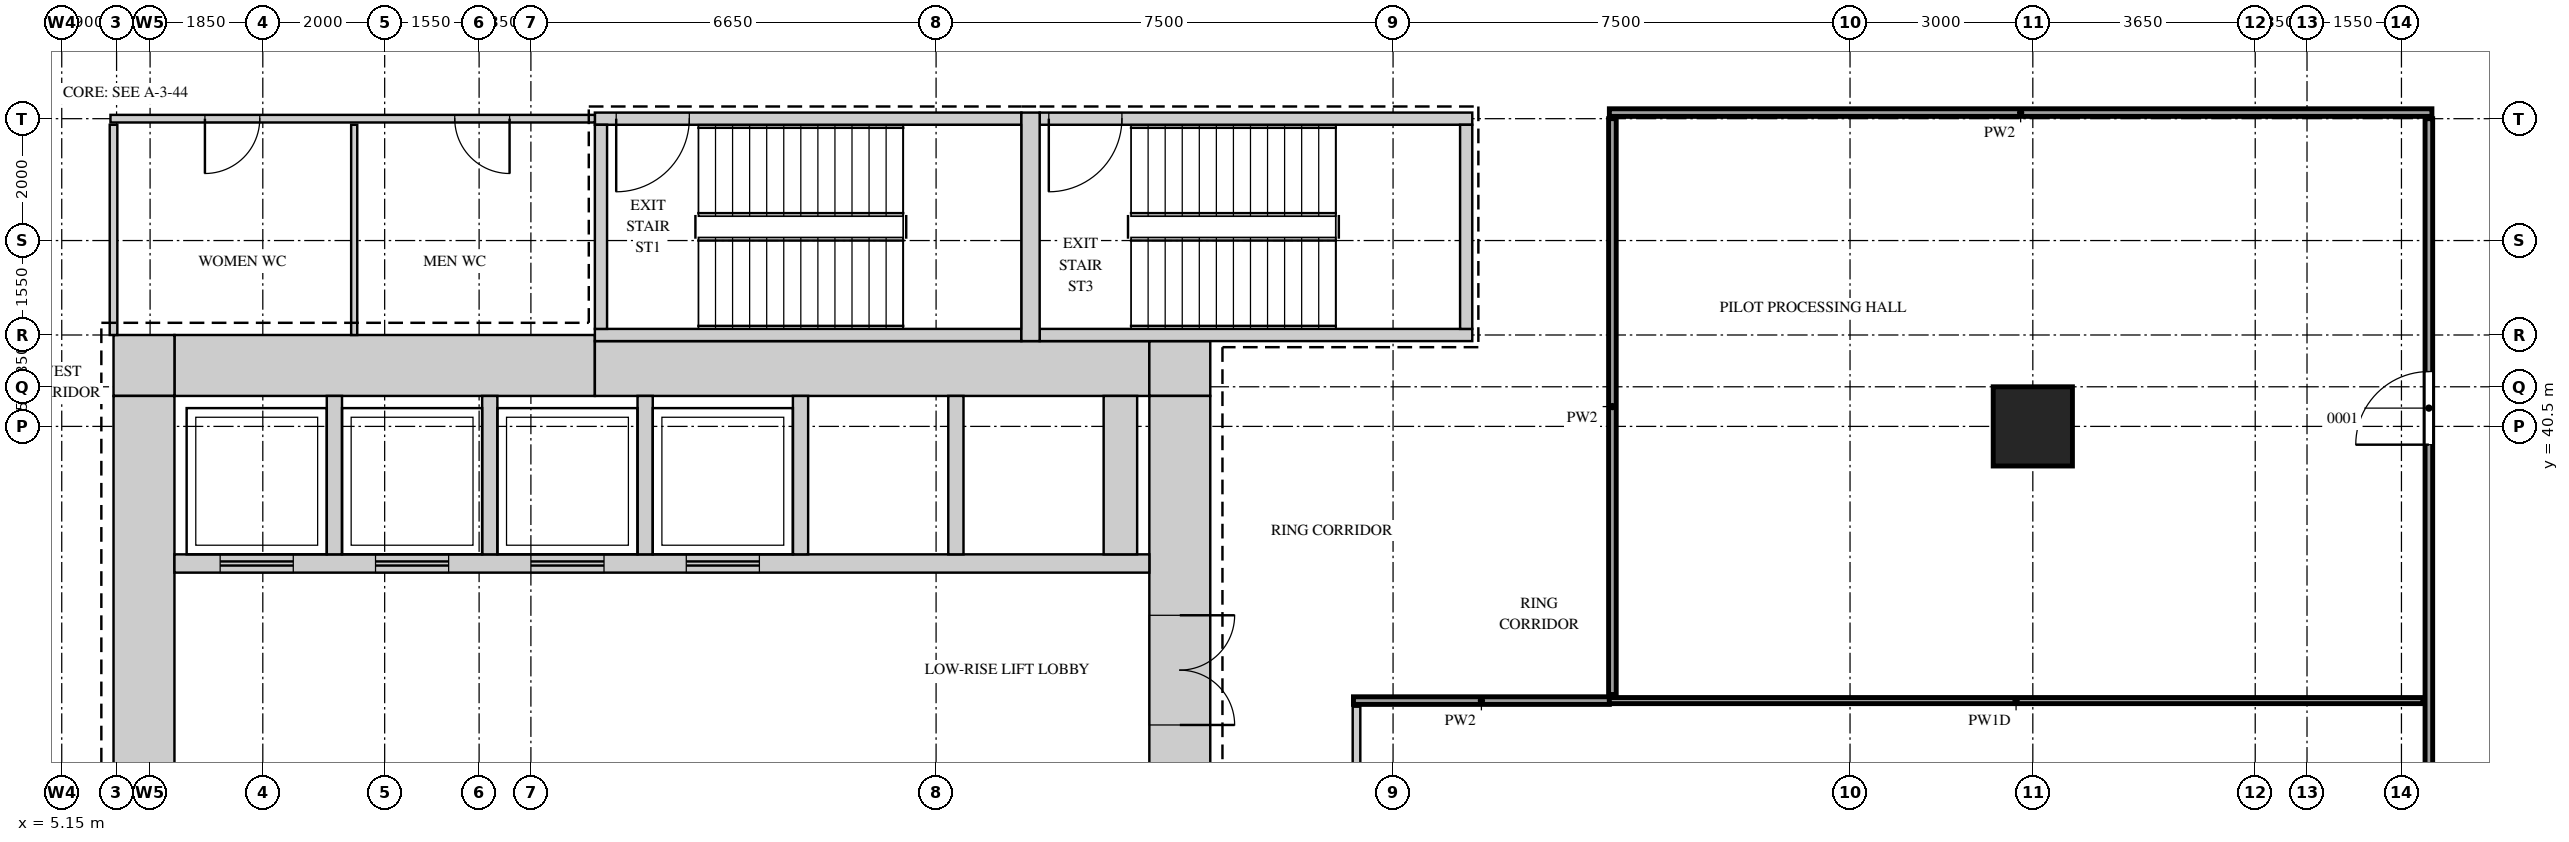
"""IFC4 building model, lengths in metres.
Left out: names, types, materials, properties, quantities, classifications, styles, units other than length and angle.
Written with IfcOpenShell. Run it as: python <this file> out.ifc"""

import sys

from ifc_helpers import new_model, si_unit, direction, frame, frame_2d, origin, origin_2d, place, context, subcontext, project, spatial, rectangle, extrude, source, transform, mapped, element, fill, save


model = new_model("IFC4")
c1 = context("Model", 3, precision=1e-05, world=origin(), true_north=direction((0.0, 1.0)))
c2 = subcontext(c1, "Body", "Model", "MODEL_VIEW")
j1 = project(units=[si_unit("LENGTHUNIT", "METRE"), si_unit("PLANEANGLEUNIT", "RADIAN")], contexts=[c1])
p1 = place(None, origin())
s1 = spatial("IfcSite", under=j1, at=p1, CompositionType="ELEMENT")
p2 = place(p1, origin())
s2 = spatial("IfcBuilding", under=s1, at=p2, CompositionType="ELEMENT")
p3 = place(p2, frame((0.0, 0.0, 114.7)))
s3 = spatial("IfcBuildingStorey", under=s2, at=p3, CompositionType="ELEMENT", Elevation=114.7)
m1 = source(origin(), c2, "Body", "SweptSolid", [
    extrude(rectangle(XDim=6.9, YDim=1.0, at=frame_2d((3.45, 0.0))), origin(), (0.0, 0.0, 1.0), 4.1),
])
p4 = place(p3, frame((7.0, 41.5, 0.0), z_axis=(0.0, 0.0, 1.0), x_axis=(1.0, 0.0, 0.0)))
e1 = element("IfcWall", 1, at=p4, inside=s3, PredefinedType="SHEAR", context=c2, shape_type="MappedRepresentation", body=[
    mapped(m1, transform((0.0, 0.0, 0.0))),
])
m2 = source(origin(), c2, "Body", "SweptSolid", [
    extrude(rectangle(XDim=9.1, YDim=0.9, at=frame_2d((4.55, 0.0))), origin(), (0.0, 0.0, 1.0), 4.1),
])
p5 = place(p3, frame((13.9, 41.45, 0.0), z_axis=(0.0, 0.0, 1.0), x_axis=(1.0, 0.0, 0.0)))
e2 = element("IfcWall", 2, at=p5, inside=s3, PredefinedType="SHEAR", context=c2, shape_type="MappedRepresentation", body=[
    mapped(m2, transform((0.0, 0.0, 0.0))),
])
m3 = source(origin(), c2, "Body", "SweptSolid", [
    extrude(rectangle(XDim=1.0, YDim=0.9, at=frame_2d((0.5, 0.0))), origin(), (0.0, 0.0, 1.0), 4.1),
])
p6 = place(p3, frame((23.0, 41.45, 0.0), z_axis=(0.0, 0.0, 1.0), x_axis=(1.0, 0.0, 0.0)))
e3 = element("IfcWall", 3, at=p6, inside=s3, PredefinedType="SHEAR", context=c2, shape_type="MappedRepresentation", body=[
    mapped(m3, transform((0.0, 0.0, 0.0))),
])
m4 = source(origin(), c2, "Body", "SweptSolid", [
    extrude(rectangle(XDim=1.0, YDim=1.0, at=frame_2d((0.5, 0.0))), origin(), (0.0, 0.0, 1.0), 4.1),
])
p7 = place(p3, frame((6.0, 41.5, 0.0), z_axis=(0.0, 0.0, 1.0), x_axis=(1.0, 0.0, 0.0)))
e4 = element("IfcWall", 4, at=p7, inside=s3, PredefinedType="SHEAR", context=c2, shape_type="MappedRepresentation", body=[
    mapped(m4, transform((0.0, 0.0, 0.0))),
])
m5 = source(origin(), c2, "Body", "SweptSolid", [
    extrude(rectangle(XDim=28.0, YDim=1.0, at=frame_2d((14.0, 0.0))), origin(), (0.0, 0.0, 1.0), 4.1),
])
p8 = place(p3, frame((23.5, 13.0, 0.0), z_axis=(0.0, 0.0, 1.0), x_axis=(0.0, 1.0, 0.0)))
e5 = element("IfcWall", 5, at=p8, inside=s3, PredefinedType="SHEAR", context=c2, shape_type="MappedRepresentation", body=[
    mapped(m5, transform((0.0, 0.0, 0.0))),
])
m6 = source(origin(), c2, "Body", "SweptSolid", [
    extrude(rectangle(XDim=1.8, YDim=2.1, at=frame_2d((0.9, 1.05))), frame((0.0, 0.51, 0.0), z_axis=(0.0, -1.0, 0.0), x_axis=(1.0, 0.0, 0.0)), (0.0, 0.0, 1.0), 1.02),
])
p9 = place(p8, frame((22.6, 0.0, 0.0)))
e6 = element("IfcOpeningElement", 6, at=p9, cuts=e5, PredefinedType="OPENING", context=c2, shape_type="MappedRepresentation", body=[
    mapped(m6, transform((0.0, 0.0, 0.0))),
])
m7 = source(origin(), c2, "Body", "SweptSolid", [
    extrude(rectangle(XDim=1.2, YDim=2.1, at=frame_2d((0.6, 1.05))), frame((0.0, 0.51, 0.0), z_axis=(0.0, -1.0, 0.0), x_axis=(1.0, 0.0, 0.0)), (0.0, 0.0, 1.0), 1.02),
])
p10 = place(p8, frame((13.85, 0.0, 0.0)))
e7 = element("IfcOpeningElement", 7, at=p10, cuts=e5, PredefinedType="OPENING", context=c2, shape_type="MappedRepresentation", body=[
    mapped(m7, transform((0.0, 0.0, 0.0))),
])
m8 = source(origin(), c2, "Body", "SweptSolid", [
    extrude(rectangle(XDim=0.9, YDim=2.1, at=frame_2d((0.45, 1.05))), frame((0.0, 0.51, 0.0), z_axis=(0.0, -1.0, 0.0), x_axis=(1.0, 0.0, 0.0)), (0.0, 0.0, 1.0), 1.02),
])
p11 = place(p8, frame((2.15, 0.0, 0.0)))
e8 = element("IfcOpeningElement", 8, at=p11, cuts=e5, PredefinedType="OPENING", context=c2, shape_type="MappedRepresentation", body=[
    mapped(m8, transform((0.0, 0.0, 0.0))),
])
p12 = place(p8, frame((7.0, 0.0, 0.0)))
e9 = element("IfcOpeningElement", 9, at=p12, cuts=e5, PredefinedType="OPENING", context=c2, shape_type="MappedRepresentation", body=[
    mapped(m8, transform((0.0, 0.0, 0.0))),
])
p13 = place(p3, frame((6.5, 13.0, 0.0), z_axis=(0.0, 0.0, 1.0), x_axis=(0.0, 1.0, 0.0)))
e10 = element("IfcWall", 10, at=p13, inside=s3, PredefinedType="SHEAR", context=c2, shape_type="MappedRepresentation", body=[
    mapped(m5, transform((0.0, 0.0, 0.0))),
])
m9 = source(origin(), c2, "Body", "SweptSolid", [
    extrude(rectangle(XDim=7.0, YDim=0.2, at=frame_2d((3.5, 0.0))), origin(), (0.0, 0.0, 1.0), 4.1),
])
p14 = place(p3, frame((13.9, 45.55, 0.0), z_axis=(0.0, 0.0, 1.0), x_axis=(1.0, 0.0, 0.0)))
e11 = element("IfcWall", 11, at=p14, inside=s3, PredefinedType="SHEAR", context=c2, shape_type="MappedRepresentation", body=[
    mapped(m9, transform((0.0, 0.0, 0.0))),
])
m10 = source(origin(), c2, "Body", "SweptSolid", [
    extrude(rectangle(XDim=1.2, YDim=2.1, at=frame_2d((0.6, 1.05))), frame((0.0, 0.11, 0.0), z_axis=(0.0, -1.0, 0.0), x_axis=(1.0, 0.0, 0.0)), (0.0, 0.0, 1.0), 0.22),
])
p15 = place(p14, frame((0.35, 0.0, 0.0)))
e12 = element("IfcOpeningElement", 12, at=p15, cuts=e11, PredefinedType="OPENING", context=c2, shape_type="MappedRepresentation", body=[
    mapped(m10, transform((0.0, 0.0, 0.0))),
])
p16 = place(p3, frame((13.9, 42.0, 0.0), z_axis=(0.0, 0.0, 1.0), x_axis=(1.0, 0.0, 0.0)))
e13 = element("IfcWall", 13, at=p16, inside=s3, PredefinedType="SHEAR", context=c2, shape_type="MappedRepresentation", body=[
    mapped(m9, transform((0.0, 0.0, 0.0))),
])
m11 = source(origin(), c2, "Body", "SweptSolid", [
    extrude(rectangle(XDim=7.1, YDim=0.2, at=frame_2d((3.55, 0.0))), origin(), (0.0, 0.0, 1.0), 4.1),
])
p17 = place(p3, frame((21.2, 45.55, 0.0), z_axis=(0.0, 0.0, 1.0), x_axis=(1.0, 0.0, 0.0)))
e14 = element("IfcWall", 14, at=p17, inside=s3, PredefinedType="SHEAR", context=c2, shape_type="MappedRepresentation", body=[
    mapped(m11, transform((0.0, 0.0, 0.0))),
])
p18 = place(p17, frame((0.15, 0.0, 0.0)))
e15 = element("IfcOpeningElement", 15, at=p18, cuts=e14, PredefinedType="OPENING", context=c2, shape_type="MappedRepresentation", body=[
    mapped(m10, transform((0.0, 0.0, 0.0))),
])
p19 = place(p3, frame((21.2, 42.0, 0.0), z_axis=(0.0, 0.0, 1.0), x_axis=(1.0, 0.0, 0.0)))
e16 = element("IfcWall", 16, at=p19, inside=s3, PredefinedType="SHEAR", context=c2, shape_type="MappedRepresentation", body=[
    mapped(m11, transform((0.0, 0.0, 0.0))),
])
m12 = source(origin(), c2, "Body", "SweptSolid", [
    extrude(rectangle(XDim=3.75, YDim=0.3, at=frame_2d((1.875, 0.0))), origin(), (0.0, 0.0, 1.0), 4.1),
])
p20 = place(p3, frame((21.05, 41.9, 0.0), z_axis=(0.0, 0.0, 1.0), x_axis=(0.0, 1.0, 0.0)))
e17 = element("IfcWall", 17, at=p20, inside=s3, PredefinedType="SHEAR", context=c2, shape_type="MappedRepresentation", body=[
    mapped(m12, transform((0.0, 0.0, 0.0))),
])
m13 = source(origin(), c2, "Body", "SweptSolid", [
    extrude(rectangle(XDim=3.35, YDim=0.2, at=frame_2d((1.675, 0.0))), origin(), (0.0, 0.0, 1.0), 4.1),
])
for number, where, z_axis, x_axis in (
    (18, (14.0, 42.1, 0.0), (0.0, 0.0, 1.0), (0.0, 1.0, 0.0)),
    (19, (28.2, 42.1, 0.0), (0.0, 0.0, 1.0), (0.0, 1.0, 0.0)),
):
    element("IfcWall", number, at=place(p3, frame(where, z_axis=z_axis, x_axis=x_axis)), inside=s3, PredefinedType="SHEAR", context=c2, shape_type="MappedRepresentation", body=[
        mapped(m13, transform((0.0, 0.0, 0.0))),
    ])
m14 = source(origin(), c2, "Body", "SweptSolid", [
    extrude(rectangle(XDim=16.0, YDim=0.3, at=frame_2d((8.0, 0.0))), origin(), (0.0, 0.0, 1.0), 4.1),
])
p21 = place(p3, frame((7.0, 38.25, 0.0), z_axis=(0.0, 0.0, 1.0), x_axis=(1.0, 0.0, 0.0)))
e20 = element("IfcWall", 20, at=p21, inside=s3, PredefinedType="STANDARD", context=c2, shape_type="MappedRepresentation", body=[
    mapped(m14, transform((0.0, 0.0, 0.0))),
])
m15 = source(origin(), c2, "Body", "SweptSolid", [
    extrude(rectangle(XDim=1.2, YDim=2.1, at=frame_2d((0.6, 1.05))), frame((0.0, 0.16, 0.0), z_axis=(0.0, -1.0, 0.0), x_axis=(1.0, 0.0, 0.0)), (0.0, 0.0, 1.0), 0.32),
])
p22 = place(p21, frame((0.75, 0.0, 0.0)))
e21 = element("IfcOpeningElement", 21, at=p22, cuts=e20, PredefinedType="OPENING", context=c2, shape_type="MappedRepresentation", body=[
    mapped(m15, transform((0.0, 0.0, 0.0))),
])
p23 = place(p21, frame((3.3, 0.0, 0.0)))
e22 = element("IfcOpeningElement", 22, at=p23, cuts=e20, PredefinedType="OPENING", context=c2, shape_type="MappedRepresentation", body=[
    mapped(m15, transform((0.0, 0.0, 0.0))),
])
p24 = place(p21, frame((5.85, 0.0, 0.0)))
e23 = element("IfcOpeningElement", 23, at=p24, cuts=e20, PredefinedType="OPENING", context=c2, shape_type="MappedRepresentation", body=[
    mapped(m15, transform((0.0, 0.0, 0.0))),
])
p25 = place(p21, frame((8.4, 0.0, 0.0)))
e24 = element("IfcOpeningElement", 24, at=p25, cuts=e20, PredefinedType="OPENING", context=c2, shape_type="MappedRepresentation", body=[
    mapped(m15, transform((0.0, 0.0, 0.0))),
])
m16 = source(origin(), c2, "Body", "SweptSolid", [
    extrude(rectangle(XDim=2.6, YDim=0.25, at=frame_2d((1.3, 0.0))), origin(), (0.0, 0.0, 1.0), 4.1),
])
for number, where, z_axis, x_axis in (
    (25, (9.625, 38.4, 0.0), (0.0, 0.0, 1.0), (0.0, 1.0, 0.0)),
    (26, (12.175, 38.4, 0.0), (0.0, 0.0, 1.0), (0.0, 1.0, 0.0)),
    (27, (14.725, 38.4, 0.0), (0.0, 0.0, 1.0), (0.0, 1.0, 0.0)),
    (28, (17.275, 38.4, 0.0), (0.0, 0.0, 1.0), (0.0, 1.0, 0.0)),
    (29, (19.825, 38.4, 0.0), (0.0, 0.0, 1.0), (0.0, 1.0, 0.0)),
):
    element("IfcWall", number, at=place(p3, frame(where, z_axis=z_axis, x_axis=x_axis)), inside=s3, PredefinedType="STANDARD", context=c2, shape_type="MappedRepresentation", body=[
        mapped(m16, transform((0.0, 0.0, 0.0))),
    ])
m17 = source(origin(), c2, "Body", "SweptSolid", [
    extrude(rectangle(XDim=2.6, YDim=0.55, at=frame_2d((1.3, 0.0))), origin(), (0.0, 0.0, 1.0), 4.1),
])
p26 = place(p3, frame((22.525, 38.4, 0.0), z_axis=(0.0, 0.0, 1.0), x_axis=(0.0, 1.0, 0.0)))
e30 = element("IfcWall", 30, at=p26, inside=s3, PredefinedType="STANDARD", context=c2, shape_type="MappedRepresentation", body=[
    mapped(m17, transform((0.0, 0.0, 0.0))),
])
m18 = source(origin(), c2, "Body", "SweptSolid", [
    extrude(rectangle(XDim=1.3, YDim=1.3, at=origin_2d()), origin(), (0.0, 0.0, 1.0), 4.1),
])
p27 = place(p3, frame((37.5, 40.5, 0.0), z_axis=(0.0, 0.0, 1.0), x_axis=(1.0, 0.0, 0.0)))
e31 = element("IfcColumn", 31, at=p27, inside=s3, PredefinedType="COLUMN", context=c2, shape_type="MappedRepresentation", body=[
    mapped(m18, transform((0.0, 0.0, 0.0))),
])
m19 = source(origin(), c2, "Body", "SweptSolid", [
    extrude(rectangle(XDim=23.2, YDim=0.125, at=frame_2d((11.6, 0.0))), origin(), (0.0, 0.0, 1.0), 4.2),
])
p28 = place(p3, frame((26.4, 12.7, 0.0), z_axis=(0.0, 0.0, 1.0), x_axis=(0.0, 1.0, 0.0)))
e32 = element("IfcWall", 32, at=p28, inside=s3, PredefinedType="PARTITIONING", context=c2, shape_type="MappedRepresentation", body=[
    mapped(m19, transform((0.0, 0.0, 0.0))),
])
m20 = source(origin(), c2, "Body", "SweptSolid", [
    extrude(rectangle(XDim=1.2, YDim=2.1, at=frame_2d((0.6, 1.05))), frame((0.0, 0.073, 0.0), z_axis=(0.0, -1.0, 0.0), x_axis=(1.0, 0.0, 0.0)), (0.0, 0.0, 1.0), 0.145),
])
p29 = place(p28, frame((6.65, 0.0, 0.0)))
e33 = element("IfcOpeningElement", 33, at=p29, cuts=e32, PredefinedType="OPENING", context=c2, shape_type="MappedRepresentation", body=[
    mapped(m20, transform((0.0, 0.0, 0.0))),
])
m21 = source(origin(), c2, "Body", "SweptSolid", [
    extrude(rectangle(XDim=32.85, YDim=0.125, at=frame_2d((16.425, 0.0))), origin(), (0.0, 0.0, 1.0), 4.2),
])
p30 = place(p3, frame((44.0, 12.7, 0.0), z_axis=(0.0, 0.0, 1.0), x_axis=(0.0, 1.0, 0.0)))
e34 = element("IfcWall", 34, at=p30, inside=s3, PredefinedType="PARTITIONING", context=c2, shape_type="MappedRepresentation", body=[
    mapped(m21, transform((0.0, 0.0, 0.0))),
])
p31 = place(p30, frame((18.2, 0.0, 0.0)))
e35 = element("IfcOpeningElement", 35, at=p31, cuts=e34, PredefinedType="OPENING", context=c2, shape_type="MappedRepresentation", body=[
    mapped(m20, transform((0.0, 0.0, 0.0))),
])
p32 = place(p30, frame((27.5, 0.0, 0.0)))
e36 = element("IfcOpeningElement", 36, at=p32, cuts=e34, PredefinedType="OPENING", context=c2, shape_type="MappedRepresentation", body=[
    mapped(m20, transform((0.0, 0.0, 0.0))),
])
m22 = source(origin(), c2, "Body", "SweptSolid", [
    extrude(rectangle(XDim=4.2, YDim=0.125, at=frame_2d((2.1, 0.0))), origin(), (0.0, 0.0, 1.0), 4.2),
])
p33 = place(p3, frame((26.35, 36.0, 0.0), z_axis=(0.0, 0.0, 1.0), x_axis=(1.0, 0.0, 0.0)))
e37 = element("IfcWall", 37, at=p33, inside=s3, PredefinedType="PARTITIONING", context=c2, shape_type="MappedRepresentation", body=[
    mapped(m22, transform((0.0, 0.0, 0.0))),
])
m23 = source(origin(), c2, "Body", "SweptSolid", [
    extrude(rectangle(XDim=13.35, YDim=0.1, at=frame_2d((6.675, 0.0))), origin(), (0.0, 0.0, 1.0), 4.2),
])
p34 = place(p3, frame((30.55, 36.0, 0.0), z_axis=(0.0, 0.0, 1.0), x_axis=(1.0, 0.0, 0.0)))
e38 = element("IfcWall", 38, at=p34, inside=s3, PredefinedType="PARTITIONING", context=c2, shape_type="MappedRepresentation", body=[
    mapped(m23, transform((0.0, 0.0, 0.0))),
])
m24 = source(origin(), c2, "Body", "SweptSolid", [
    extrude(rectangle(XDim=9.45, YDim=0.125, at=frame_2d((4.725, 0.0))), origin(), (0.0, 0.0, 1.0), 4.2),
])
p35 = place(p3, frame((30.6, 36.1, 0.0), z_axis=(0.0, 0.0, 1.0), x_axis=(0.0, 1.0, 0.0)))
e39 = element("IfcWall", 39, at=p35, inside=s3, PredefinedType="PARTITIONING", context=c2, shape_type="MappedRepresentation", body=[
    mapped(m24, transform((0.0, 0.0, 0.0))),
])
m25 = source(origin(), c2, "Body", "SweptSolid", [
    extrude(rectangle(XDim=3.45, YDim=0.125, at=frame_2d((1.725, 0.0))), origin(), (0.0, 0.0, 1.0), 4.2),
])
p36 = place(p3, frame((6.0, 42.0, 0.0), z_axis=(0.0, 0.0, 1.0), x_axis=(0.0, 1.0, 0.0)))
e40 = element("IfcWall", 40, at=p36, inside=s3, PredefinedType="PARTITIONING", context=c2, shape_type="MappedRepresentation", body=[
    mapped(m25, transform((0.0, 0.0, 0.0))),
])
m26 = source(origin(), c2, "Body", "SweptSolid", [
    extrude(rectangle(XDim=3.45, YDim=0.1, at=frame_2d((1.725, 0.0))), origin(), (0.0, 0.0, 1.0), 4.2),
])
p37 = place(p3, frame((9.95, 42.0, 0.0), z_axis=(0.0, 0.0, 1.0), x_axis=(0.0, 1.0, 0.0)))
e41 = element("IfcWall", 41, at=p37, inside=s3, PredefinedType="PARTITIONING", context=c2, shape_type="MappedRepresentation", body=[
    mapped(m26, transform((0.0, 0.0, 0.0))),
])
m27 = source(origin(), c2, "Body", "SweptSolid", [
    extrude(rectangle(XDim=7.95, YDim=0.125, at=frame_2d((3.975, 0.0))), origin(), (0.0, 0.0, 1.0), 4.2),
])
p38 = place(p3, frame((5.95, 45.55, 0.0), z_axis=(0.0, 0.0, 1.0), x_axis=(1.0, 0.0, 0.0)))
e42 = element("IfcWall", 42, at=p38, inside=s3, PredefinedType="PARTITIONING", context=c2, shape_type="MappedRepresentation", body=[
    mapped(m27, transform((0.0, 0.0, 0.0))),
])
m28 = source(origin(), c2, "Body", "SweptSolid", [
    extrude(rectangle(XDim=0.9, YDim=2.1, at=frame_2d((0.45, 1.05))), frame((0.0, 0.073, 0.0), z_axis=(0.0, -1.0, 0.0), x_axis=(1.0, 0.0, 0.0)), (0.0, 0.0, 1.0), 0.145),
])
p39 = place(p38, frame((1.55, 0.0, 0.0)))
e43 = element("IfcOpeningElement", 43, at=p39, cuts=e42, PredefinedType="OPENING", context=c2, shape_type="MappedRepresentation", body=[
    mapped(m28, transform((0.0, 0.0, 0.0))),
])
p40 = place(p38, frame((5.65, 0.0, 0.0)))
e44 = element("IfcOpeningElement", 44, at=p40, cuts=e42, PredefinedType="OPENING", context=c2, shape_type="MappedRepresentation", body=[
    mapped(m28, transform((0.0, 0.0, 0.0))),
])
m29 = source(origin(), c2, "Body", "SweptSolid", [
    extrude(rectangle(XDim=13.5, YDim=0.125, at=frame_2d((6.75, 0.0))), origin(), (0.0, 0.0, 1.0), 4.2),
])
p41 = place(p3, frame((30.55, 45.65, 0.0), z_axis=(0.0, 0.0, 1.0), x_axis=(1.0, 0.0, 0.0)))
e45 = element("IfcWall", 45, at=p41, inside=s3, PredefinedType="PARTITIONING", context=c2, shape_type="MappedRepresentation", body=[
    mapped(m29, transform((0.0, 0.0, 0.0))),
])
m30 = source(origin(), c2, "Body", "SweptSolid", [
    extrude(rectangle(XDim=1.8, YDim=2.1, at=frame_2d((0.9, 1.05))), frame((0.0, 0.45, 0.0), z_axis=(0.0, -1.0, 0.0), x_axis=(1.0, 0.0, 0.0)), (0.0, 0.0, 1.0), 0.9),
])
p42 = place(p9, origin())
e46 = element("IfcDoor", 46, at=p42, inside=s3, OperationType="DOUBLE_DOOR_SINGLE_SWING", PredefinedType="DOOR", context=c2, shape_type="MappedRepresentation", body=[
    mapped(m30, transform((0.0, 0.0, 0.0))),
])
fill(e6, e46)
m31 = source(origin(), c2, "Body", "SweptSolid", [
    extrude(rectangle(XDim=1.2, YDim=2.1, at=frame_2d((0.6, 1.05))), frame((0.0, 0.025, 0.0), z_axis=(0.0, -1.0, 0.0), x_axis=(1.0, 0.0, 0.0)), (0.0, 0.0, 1.0), 0.05),
])
p43 = place(p32, origin())
e47 = element("IfcDoor", 47, at=p43, inside=s3, OperationType="SINGLE_SWING_RIGHT", PredefinedType="DOOR", context=c2, shape_type="MappedRepresentation", body=[
    mapped(m31, transform((0.0, 0.0, 0.0))),
])
fill(e36, e47)
m32 = source(origin(), c2, "Body", "SweptSolid", [
    extrude(rectangle(XDim=0.9, YDim=2.1, at=frame_2d((0.45, 1.05))), frame((0.0, 0.025, 0.0), z_axis=(0.0, -1.0, 0.0), x_axis=(1.0, 0.0, 0.0)), (0.0, 0.0, 1.0), 0.05),
])
p44 = place(p39, origin())
e48 = element("IfcDoor", 48, at=p44, inside=s3, OperationType="SINGLE_SWING_LEFT", PredefinedType="DOOR", context=c2, shape_type="MappedRepresentation", body=[
    mapped(m32, transform((0.0, 0.0, 0.0))),
])
fill(e43, e48)
p45 = place(p40, origin())
e49 = element("IfcDoor", 49, at=p45, inside=s3, OperationType="SINGLE_SWING_RIGHT", PredefinedType="DOOR", context=c2, shape_type="MappedRepresentation", body=[
    mapped(m32, transform((0.0, 0.0, 0.0))),
])
fill(e44, e49)
p46 = place(p15, origin())
e50 = element("IfcDoor", 50, at=p46, inside=s3, OperationType="SINGLE_SWING_LEFT", PredefinedType="DOOR", context=c2, shape_type="MappedRepresentation", body=[
    mapped(m31, transform((0.0, 0.0, 0.0))),
])
fill(e12, e50)
p47 = place(p18, origin())
e51 = element("IfcDoor", 51, at=p47, inside=s3, OperationType="SINGLE_SWING_LEFT", PredefinedType="DOOR", context=c2, shape_type="MappedRepresentation", body=[
    mapped(m31, transform((0.0, 0.0, 0.0))),
])
fill(e15, e51)
p48 = place(p22, origin())
e52 = element("IfcDoor", 52, at=p48, inside=s3, OperationType="DOUBLE_DOOR_SLIDING", PredefinedType="DOOR", context=c2, shape_type="MappedRepresentation", body=[
    mapped(m31, transform((0.0, 0.0, 0.0))),
])
fill(e21, e52)
p49 = place(p23, origin())
e53 = element("IfcDoor", 53, at=p49, inside=s3, OperationType="DOUBLE_DOOR_SLIDING", PredefinedType="DOOR", context=c2, shape_type="MappedRepresentation", body=[
    mapped(m31, transform((0.0, 0.0, 0.0))),
])
fill(e22, e53)
p50 = place(p24, origin())
e54 = element("IfcDoor", 54, at=p50, inside=s3, OperationType="DOUBLE_DOOR_SLIDING", PredefinedType="DOOR", context=c2, shape_type="MappedRepresentation", body=[
    mapped(m31, transform((0.0, 0.0, 0.0))),
])
fill(e23, e54)
p51 = place(p25, origin())
e55 = element("IfcDoor", 55, at=p51, inside=s3, OperationType="DOUBLE_DOOR_SLIDING", PredefinedType="DOOR", context=c2, shape_type="MappedRepresentation", body=[
    mapped(m31, transform((0.0, 0.0, 0.0))),
])
fill(e24, e55)
save(model, sys.argv[1])
